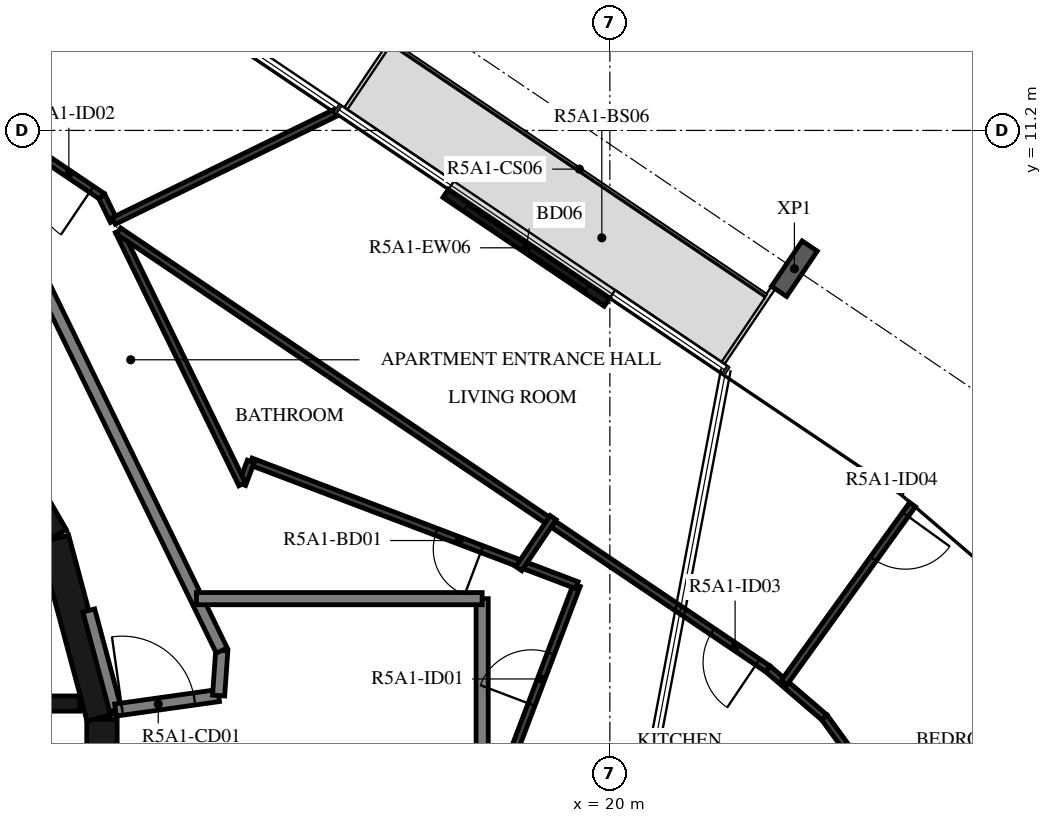
"""IFC4 building model, lengths in metres.
Left out: names, types, materials, properties, quantities, classifications, styles, units other than length and angle.
Written with IfcOpenShell. Run it as: python <this file> out.ifc"""

import sys

from ifc_helpers import new_model, si_unit, direction, frame, frame_2d, origin, origin_2d, place, context, subcontext, project, spatial, rectangle, i_section, extrude, element, fill, save


model = new_model("IFC4")
c1 = context("Model", 3, precision=1e-05, world=origin(), true_north=direction((0.0, 1.0)))
c2 = subcontext(c1, "Body", "Model", "MODEL_VIEW")
j1 = project(units=[si_unit("LENGTHUNIT", "METRE"), si_unit("PLANEANGLEUNIT", "RADIAN")], contexts=[c1])
p1 = place(None, origin())
s1 = spatial("IfcSite", under=j1, at=p1, CompositionType="ELEMENT")
p2 = place(p1, origin())
s2 = spatial("IfcBuilding", under=s1, at=p2, CompositionType="ELEMENT")
p3 = place(p2, frame((0.0, 0.0, 191.9)))
s3 = spatial("IfcBuildingStorey", under=s2, at=p3, CompositionType="ELEMENT", Elevation=191.9)
p4 = place(p3, frame((23.035, 8.926, -0.38), z_axis=(0.0, 0.0, 1.0), x_axis=(0.829037661466, -0.559192771654, 0.0)))
e1 = element("IfcColumn", 1, at=p4, inside=s3, PredefinedType="COLUMN", context=c2, shape_type="SweptSolid", body=[
    extrude(i_section(OverallWidth=0.3, OverallDepth=0.9, WebThickness=0.019, FlangeThickness=0.035, FilletRadius=0.03, at=origin_2d()), origin(), (0.0, 0.0, 1.0), 3.5),
])
p5 = place(p3, frame((19.953, 8.375, 0.0), z_axis=(0.0, 0.0, 1.0), x_axis=(-0.829068838882, 0.55914654644, 0.0)))
e2 = element("IfcWall", 2, at=p5, inside=s3, PredefinedType="STANDARD", context=c2, shape_type="SweptSolid", body=[
    extrude(rectangle(XDim=3.2, YDim=0.16, at=frame_2d((1.6, 0.0))), origin(), (0.0, 0.0, 1.0), 3.12),
])
p6 = place(p5, frame((0.4, 0.0, 0.0)))
e3 = element("IfcOpeningElement", 3, at=p6, cuts=e2, PredefinedType="OPENING", context=c2, shape_type="SweptSolid", body=[
    extrude(rectangle(XDim=2.4, YDim=2.4, at=frame_2d((1.2, 1.2))), frame((0.0, 0.09, 0.0), z_axis=(0.0, -1.0, 0.0), x_axis=(1.0, 0.0, 0.0)), (0.0, 0.0, 1.0), 0.18),
])
p7 = place(p3, frame((11.647, -1.516, 0.0), z_axis=(0.0, 0.0, 1.0), x_axis=(0.0, 1.0, 0.0)))
e4 = element("IfcWall", 4, at=p7, inside=s3, PredefinedType="SHEAR", context=c2, shape_type="SweptSolid", body=[
    extrude(rectangle(XDim=3.033, YDim=0.5, at=frame_2d((1.516, 0.0))), origin(), (0.0, 0.0, 1.0), 3.12),
])
p8 = place(p7, frame((0.616, 0.0, 0.0)))
e5 = element("IfcOpeningElement", 5, at=p8, cuts=e4, PredefinedType="OPENING", context=c2, shape_type="SweptSolid", body=[
    extrude(rectangle(XDim=1.8, YDim=2.1, at=frame_2d((0.9, 1.05))), frame((0.0, 0.26, 0.0), z_axis=(0.0, -1.0, 0.0), x_axis=(1.0, 0.0, 0.0)), (0.0, 0.0, 1.0), 0.52),
])
for number, where, z_axis, x_axis in (
    (6, (11.643, 1.55, 0.0), (0.0, 0.0, 1.0), (-0.259, 0.966, 0.0)),
    (7, (10.845, 4.51, 0.0), (0.0, 0.0, 1.0), (-0.5, 0.866, 0.0)),
):
    element("IfcWall", number, at=place(p3, frame(where, z_axis=z_axis, x_axis=x_axis)), inside=s3, PredefinedType="SHEAR", context=c2, shape_type="SweptSolid", body=[
        extrude(rectangle(XDim=3.033, YDim=0.5, at=frame_2d((1.516, 0.0))), origin(), (0.0, 0.0, 1.0), 3.12),
    ])
p9 = place(p3, frame((3.35, 1.775, 0.0), z_axis=(0.0, 0.0, 1.0), x_axis=(1.0, 0.0, 0.0)))
e8 = element("IfcWall", 8, at=p9, inside=s3, PredefinedType="SHEAR", context=c2, shape_type="SweptSolid", body=[
    extrude(rectangle(XDim=7.93, YDim=0.25, at=frame_2d((3.965, 0.0))), origin(), (0.0, 0.0, 1.0), 3.12),
])
p10 = place(p9, frame((0.35, 0.0, 0.0)))
e9 = element("IfcOpeningElement", 9, at=p10, cuts=e8, PredefinedType="OPENING", context=c2, shape_type="SweptSolid", body=[
    extrude(rectangle(XDim=1.2, YDim=2.4, at=frame_2d((0.6, 1.2))), frame((0.0, 0.135, 0.0), z_axis=(0.0, -1.0, 0.0), x_axis=(1.0, 0.0, 0.0)), (0.0, 0.0, 1.0), 0.27),
])
p11 = place(p9, frame((2.5, 0.0, 0.0)))
e10 = element("IfcOpeningElement", 10, at=p11, cuts=e8, PredefinedType="OPENING", context=c2, shape_type="SweptSolid", body=[
    extrude(rectangle(XDim=1.2, YDim=2.4, at=frame_2d((0.6, 1.2))), frame((0.0, 0.135, 0.0), z_axis=(0.0, -1.0, 0.0), x_axis=(1.0, 0.0, 0.0)), (0.0, 0.0, 1.0), 0.27),
])
p12 = place(p9, frame((4.8, 0.0, 0.0)))
e11 = element("IfcOpeningElement", 11, at=p12, cuts=e8, PredefinedType="OPENING", context=c2, shape_type="SweptSolid", body=[
    extrude(rectangle(XDim=0.9, YDim=2.1, at=frame_2d((0.45, 1.05))), frame((0.0, 0.135, 0.0), z_axis=(0.0, -1.0, 0.0), x_axis=(1.0, 0.0, 0.0)), (0.0, 0.0, 1.0), 0.27),
])
p13 = place(p3, frame((11.87, 1.668, 0.0), z_axis=(0.0, 0.0, 1.0), x_axis=(-0.258836880648, 0.965921047093, 0.0)))
e12 = element("IfcWall", 12, at=p13, inside=s3, PredefinedType="STANDARD", context=c2, shape_type="SweptSolid", body=[
    extrude(rectangle(XDim=1.695, YDim=0.2, at=frame_2d((0.848, 0.0))), origin(), (0.0, 0.0, 1.0), 3.12),
])
p14 = place(p3, frame((11.87, 1.668, 0.0), z_axis=(0.0, 0.0, 1.0), x_axis=(0.990271931984, 0.139145609792, 0.0)))
e13 = element("IfcWall", 13, at=p14, inside=s3, PredefinedType="STANDARD", context=c2, shape_type="SweptSolid", body=[
    extrude(rectangle(XDim=1.712, YDim=0.2, at=frame_2d((0.856, 0.0))), origin(), (0.0, 0.0, 1.0), 3.12),
])
p15 = place(p14, frame((0.11, 0.0, 0.0)))
e14 = element("IfcOpeningElement", 14, at=p15, cuts=e13, PredefinedType="OPENING", context=c2, shape_type="SweptSolid", body=[
    extrude(rectangle(XDim=1.2, YDim=2.1, at=frame_2d((0.6, 1.05))), frame((0.0, 0.11, 0.0), z_axis=(0.0, -1.0, 0.0), x_axis=(1.0, 0.0, 0.0)), (0.0, 0.0, 1.0), 0.22),
])
p16 = place(p3, frame((13.566, 1.906, 0.0), z_axis=(0.0, 0.0, 1.0), x_axis=(0.07005495793, 0.997543133338, 0.0)))
e15 = element("IfcWall", 15, at=p16, inside=s3, PredefinedType="STANDARD", context=c2, shape_type="SweptSolid", body=[
    extrude(rectangle(XDim=0.742, YDim=0.2, at=frame_2d((0.371, 0.0))), origin(), (0.0, 0.0, 1.0), 3.12),
])
p17 = place(p3, frame((13.618, 2.647, 0.0), z_axis=(0.0, 0.0, 1.0), x_axis=(-0.438366026218, 0.898796543751, 0.0)))
e16 = element("IfcWall", 16, at=p17, inside=s3, PredefinedType="STANDARD", context=c2, shape_type="SweptSolid", body=[
    extrude(rectangle(XDim=7.181, YDim=0.2, at=frame_2d((3.591, 0.0))), origin(), (0.0, 0.0, 1.0), 3.12),
])
p18 = place(p3, frame((17.9, -3.5, 0.0), z_axis=(0.0, 0.0, 1.0), x_axis=(0.0, 1.0, 0.0)))
e17 = element("IfcWall", 17, at=p18, inside=s3, PredefinedType="STANDARD", context=c2, shape_type="SweptSolid", body=[
    extrude(rectangle(XDim=7.0, YDim=0.2, at=frame_2d((3.5, 0.0))), origin(), (0.0, 0.0, 1.0), 3.12),
])
p19 = place(p3, frame((17.9, 3.5, 0.0), z_axis=(0.0, 0.0, 1.0), x_axis=(-1.0, 0.0, 0.0)))
e18 = element("IfcWall", 18, at=p19, inside=s3, PredefinedType="STANDARD", context=c2, shape_type="SweptSolid", body=[
    extrude(rectangle(XDim=4.698, YDim=0.2, at=frame_2d((2.349, 0.0))), origin(), (0.0, 0.0, 1.0), 3.12),
])
p20 = place(p3, frame((18.286, 0.637, 0.0), z_axis=(0.0, 0.0, 1.0), x_axis=(0.354672075988, 0.934990758518, 0.0)))
e19 = element("IfcWall", 19, at=p20, inside=s3, PredefinedType="PARTITIONING", context=c2, shape_type="SweptSolid", body=[
    extrude(rectangle(XDim=3.3, YDim=0.12, at=frame_2d((1.65, 0.0))), origin(), (0.0, 0.0, 1.0), 3.12),
])
p21 = place(p20, frame((1.2, 0.0, 0.0)))
e20 = element("IfcOpeningElement", 20, at=p21, cuts=e19, PredefinedType="OPENING", context=c2, shape_type="SweptSolid", body=[
    extrude(rectangle(XDim=0.9, YDim=2.1, at=frame_2d((0.45, 1.05))), frame((0.0, 0.07, 0.0), z_axis=(0.0, -1.0, 0.0), x_axis=(1.0, 0.0, 0.0)), (0.0, 0.0, 1.0), 0.14),
])
p22 = place(p3, frame((19.456, 3.722, 0.0), z_axis=(0.0, 0.0, 1.0), x_axis=(-0.935017484321, 0.3546016131, 0.0)))
e21 = element("IfcWall", 21, at=p22, inside=s3, PredefinedType="PARTITIONING", context=c2, shape_type="SweptSolid", body=[
    extrude(rectangle(XDim=5.734, YDim=0.12, at=frame_2d((2.867, 0.0))), origin(), (0.0, 0.0, 1.0), 3.12),
])
p23 = place(p22, frame((1.669, 0.0, 0.0)))
e22 = element("IfcOpeningElement", 22, at=p23, cuts=e21, PredefinedType="OPENING", context=c2, shape_type="SweptSolid", body=[
    extrude(rectangle(XDim=0.8, YDim=2.1, at=frame_2d((0.4, 1.05))), frame((0.0, 0.07, 0.0), z_axis=(0.0, -1.0, 0.0), x_axis=(1.0, 0.0, 0.0)), (0.0, 0.0, 1.0), 0.14),
])
p24 = place(p3, frame((14.094, 5.756, 0.0), z_axis=(0.0, 0.0, 1.0), x_axis=(-0.354267529254, -0.935144116014, 0.0)))
e23 = element("IfcWall", 23, at=p24, inside=s3, PredefinedType="PARTITIONING", context=c2, shape_type="SweptSolid", body=[
    extrude(rectangle(XDim=0.4, YDim=0.12, at=frame_2d((0.2, 0.0))), origin(), (0.0, 0.0, 1.0), 3.12),
])
p25 = place(p3, frame((13.953, 5.382, 0.0), z_axis=(0.0, 0.0, 1.0), x_axis=(-0.438382107355, 0.898788700391, 0.0)))
e24 = element("IfcWall", 24, at=p25, inside=s3, PredefinedType="PARTITIONING", context=c2, shape_type="SweptSolid", body=[
    extrude(rectangle(XDim=4.634, YDim=0.12, at=frame_2d((2.317, 0.0))), origin(), (0.0, 0.0, 1.0), 3.12),
])
p26 = place(p3, frame((11.841, 9.712, 0.0), z_axis=(0.0, 0.0, 1.0), x_axis=(-0.438381293215, 0.898789097486, 0.0)))
e25 = element("IfcWall", 25, at=p26, inside=s3, PredefinedType="PARTITIONING", context=c2, shape_type="SweptSolid", body=[
    extrude(rectangle(XDim=0.454, YDim=0.12, at=frame_2d((0.227, 0.0))), origin(), (0.0, 0.0, 1.0), 3.12),
])
p27 = place(p3, frame((11.642, 10.12, 0.0), z_axis=(0.0, 0.0, 1.0), x_axis=(-0.829032241779, 0.55920080659, 0.0)))
e26 = element("IfcWall", 26, at=p27, inside=s3, PredefinedType="PARTITIONING", context=c2, shape_type="SweptSolid", body=[
    extrude(rectangle(XDim=7.985, YDim=0.12, at=frame_2d((3.992, 0.0))), origin(), (0.0, 0.0, 1.0), 3.12),
])
p28 = place(p27, frame((0.2, 0.0, 0.0)))
e27 = element("IfcOpeningElement", 27, at=p28, cuts=e26, PredefinedType="OPENING", context=c2, shape_type="SweptSolid", body=[
    extrude(rectangle(XDim=0.9, YDim=2.1, at=frame_2d((0.45, 1.05))), frame((0.0, 0.07, 0.0), z_axis=(0.0, -1.0, 0.0), x_axis=(1.0, 0.0, 0.0)), (0.0, 0.0, 1.0), 0.14),
])
p29 = place(p27, frame((5.475, 0.0, 0.0)))
e28 = element("IfcOpeningElement", 28, at=p29, cuts=e26, PredefinedType="OPENING", context=c2, shape_type="SweptSolid", body=[
    extrude(rectangle(XDim=0.9, YDim=2.1, at=frame_2d((0.45, 1.05))), frame((0.0, 0.07, 0.0), z_axis=(0.0, -1.0, 0.0), x_axis=(1.0, 0.0, 0.0)), (0.0, 0.0, 1.0), 0.14),
])
p30 = place(p3, frame((22.598, 2.345, 0.0), z_axis=(0.0, 0.0, 1.0), x_axis=(0.758596166141, -0.651561092083, 0.0)))
e29 = element("IfcWall", 29, at=p30, inside=s3, PredefinedType="PARTITIONING", context=c2, shape_type="SweptSolid", body=[
    extrude(rectangle(XDim=1.227, YDim=0.12, at=frame_2d((0.614, 0.0))), origin(), (0.0, 0.0, 1.0), 3.12),
])
p31 = place(p3, frame((23.529, 1.545, 0.0), z_axis=(0.0, 0.0, 1.0), x_axis=(0.587742994292, -0.809047694923, 0.0)))
e30 = element("IfcWall", 30, at=p31, inside=s3, PredefinedType="PARTITIONING", context=c2, shape_type="SweptSolid", body=[
    extrude(rectangle(XDim=1.016, YDim=0.12, at=frame_2d((0.508, 0.0))), origin(), (0.0, 0.0, 1.0), 3.12),
])
p32 = place(p3, frame((24.978, 5.047, 0.0), z_axis=(0.0, 0.0, 1.0), x_axis=(-0.585041443684, -0.811003396523, 0.0)))
e31 = element("IfcWall", 31, at=p32, inside=s3, PredefinedType="PARTITIONING", context=c2, shape_type="SweptSolid", body=[
    extrude(rectangle(XDim=3.613, YDim=0.12, at=frame_2d((1.807, 0.0))), origin(), (0.0, 0.0, 1.0), 3.12),
])
p33 = place(p32, frame((0.2, 0.0, 0.0)))
e32 = element("IfcOpeningElement", 32, at=p33, cuts=e31, PredefinedType="OPENING", context=c2, shape_type="SweptSolid", body=[
    extrude(rectangle(XDim=0.9, YDim=2.1, at=frame_2d((0.45, 1.05))), frame((0.0, 0.07, 0.0), z_axis=(0.0, -1.0, 0.0), x_axis=(1.0, 0.0, 0.0)), (0.0, 0.0, 1.0), 0.14),
])
p34 = place(p3, frame((22.598, 2.345, 0.0), z_axis=(0.0, 0.0, 1.0), x_axis=(-0.829034113947, 0.559198031034, 0.0)))
e33 = element("IfcWall", 33, at=p34, inside=s3, PredefinedType="PARTITIONING", context=c2, shape_type="SweptSolid", body=[
    extrude(rectangle(XDim=12.879, YDim=0.12, at=frame_2d((6.439, 0.0))), origin(), (0.0, 0.0, 1.0), 3.12),
])
p35 = place(p34, frame((0.2, 0.0, 0.0)))
e34 = element("IfcOpeningElement", 34, at=p35, cuts=e33, PredefinedType="OPENING", context=c2, shape_type="SweptSolid", body=[
    extrude(rectangle(XDim=0.9, YDim=2.1, at=frame_2d((0.45, 1.05))), frame((0.0, 0.07, 0.0), z_axis=(0.0, -1.0, 0.0), x_axis=(1.0, 0.0, 0.0)), (0.0, 0.0, 1.0), 0.14),
])
p36 = place(p3, frame((19.067, 4.832, 0.0), z_axis=(0.0, 0.0, 1.0), x_axis=(-0.559257363459, -0.828994090098, 0.0)))
e35 = element("IfcWall", 35, at=p36, inside=s3, PredefinedType="PARTITIONING", context=c2, shape_type="SweptSolid", body=[
    extrude(rectangle(XDim=1.012, YDim=0.12, at=frame_2d((0.506, 0.0))), origin(), (0.0, 0.0, 1.0), 3.12),
])
p37 = place(p3, frame((15.482, 11.487, 0.0), z_axis=(0.0, 0.0, 1.0), x_axis=(-0.898807251285, -0.438344071521, 0.0)))
e36 = element("IfcWall", 36, at=p37, inside=s3, PredefinedType="PARTITIONING", context=c2, shape_type="SweptSolid", body=[
    extrude(rectangle(XDim=4.051, YDim=0.12, at=frame_2d((2.025, 0.0))), origin(), (0.0, 0.0, 1.0), 3.12),
])
p38 = place(p6, origin())
e37 = element("IfcDoor", 37, at=p38, inside=s3, OperationType="DOUBLE_DOOR_SLIDING", PredefinedType="DOOR", context=c2, shape_type="SweptSolid", body=[
    extrude(rectangle(XDim=2.4, YDim=2.4, at=frame_2d((1.2, 1.2))), frame((0.0, 0.025, 0.0), z_axis=(0.0, -1.0, 0.0), x_axis=(1.0, 0.0, 0.0)), (0.0, 0.0, 1.0), 0.05),
])
fill(e3, e37)
p39 = place(p21, origin())
e38 = element("IfcDoor", 38, at=p39, inside=s3, OperationType="SINGLE_SWING_LEFT", PredefinedType="DOOR", context=c2, shape_type="SweptSolid", body=[
    extrude(rectangle(XDim=0.9, YDim=2.1, at=frame_2d((0.45, 1.05))), frame((0.0, 0.025, 0.0), z_axis=(0.0, -1.0, 0.0), x_axis=(1.0, 0.0, 0.0)), (0.0, 0.0, 1.0), 0.05),
])
fill(e20, e38)
p40 = place(p23, origin())
e39 = element("IfcDoor", 39, at=p40, inside=s3, OperationType="SINGLE_SWING_LEFT", PredefinedType="DOOR", context=c2, shape_type="SweptSolid", body=[
    extrude(rectangle(XDim=0.8, YDim=2.1, at=frame_2d((0.4, 1.05))), frame((0.0, 0.025, 0.0), z_axis=(0.0, -1.0, 0.0), x_axis=(1.0, 0.0, 0.0)), (0.0, 0.0, 1.0), 0.05),
])
fill(e22, e39)
p41 = place(p28, origin())
e40 = element("IfcDoor", 40, at=p41, inside=s3, OperationType="SINGLE_SWING_LEFT", PredefinedType="DOOR", context=c2, shape_type="SweptSolid", body=[
    extrude(rectangle(XDim=0.9, YDim=2.1, at=frame_2d((0.45, 1.05))), frame((0.0, 0.025, 0.0), z_axis=(0.0, -1.0, 0.0), x_axis=(1.0, 0.0, 0.0)), (0.0, 0.0, 1.0), 0.05),
])
fill(e27, e40)
p42 = place(p35, origin())
e41 = element("IfcDoor", 41, at=p42, inside=s3, OperationType="SINGLE_SWING_LEFT", PredefinedType="DOOR", context=c2, shape_type="SweptSolid", body=[
    extrude(rectangle(XDim=0.9, YDim=2.1, at=frame_2d((0.45, 1.05))), frame((0.0, 0.025, 0.0), z_axis=(0.0, -1.0, 0.0), x_axis=(1.0, 0.0, 0.0)), (0.0, 0.0, 1.0), 0.05),
])
fill(e34, e41)
p43 = place(p33, origin())
e42 = element("IfcDoor", 42, at=p43, inside=s3, OperationType="SINGLE_SWING_LEFT", PredefinedType="DOOR", context=c2, shape_type="SweptSolid", body=[
    extrude(rectangle(XDim=0.9, YDim=2.1, at=frame_2d((0.45, 1.05))), frame((0.0, 0.025, 0.0), z_axis=(0.0, -1.0, 0.0), x_axis=(1.0, 0.0, 0.0)), (0.0, 0.0, 1.0), 0.05),
])
fill(e32, e42)
p44 = place(p15, origin())
e43 = element("IfcDoor", 43, at=p44, inside=s3, OperationType="DOUBLE_DOOR_SINGLE_SWING", PredefinedType="DOOR", context=c2, shape_type="SweptSolid", body=[
    extrude(rectangle(XDim=1.2, YDim=2.1, at=frame_2d((0.6, 1.05))), frame((0.0, 0.025, 0.0), z_axis=(0.0, -1.0, 0.0), x_axis=(1.0, 0.0, 0.0)), (0.0, 0.0, 1.0), 0.05),
])
fill(e14, e43)
save(model, sys.argv[1])
